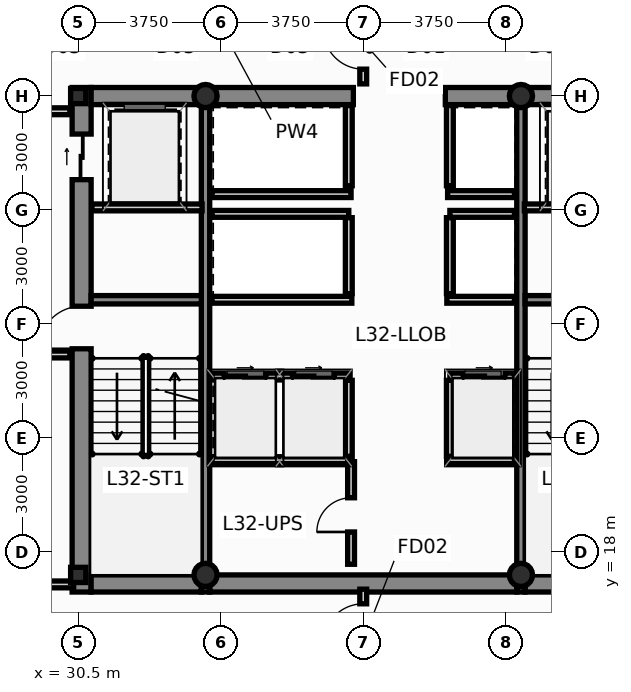
"""IFC4 building model, lengths in metres.
Left out: names, types, materials, properties, quantities, classifications, styles, units other than length and angle.
Written with IfcOpenShell. Run it as: python <this file> out.ifc"""

import sys

from ifc_helpers import new_model, si_unit, direction, frame, frame_2d, origin, origin_2d, place, context, subcontext, project, spatial, rectangle, hollow_circle, i_section, extrude, source, transform, mapped, element, fill, save


model = new_model("IFC4")
c1 = context("Model", 3, precision=1e-05, world=origin(), true_north=direction((0.0, 1.0)))
c2 = subcontext(c1, "Body", "Model", "MODEL_VIEW")
j1 = project(units=[si_unit("LENGTHUNIT", "METRE"), si_unit("PLANEANGLEUNIT", "RADIAN")], contexts=[c1])
p1 = place(None, origin())
s1 = spatial("IfcSite", under=j1, at=p1, CompositionType="ELEMENT")
p2 = place(p1, origin())
s2 = spatial("IfcBuilding", under=s1, at=p2, CompositionType="ELEMENT")
p3 = place(p2, frame((0.0, 0.0, 123.65)))
s3 = spatial("IfcBuildingStorey", under=s2, at=p3, CompositionType="ELEMENT", Elevation=123.65)
m1 = source(origin(), c2, "Body", "SweptSolid", [
    extrude(i_section(OverallWidth=0.4, OverallDepth=0.4, WebThickness=0.02, FlangeThickness=0.032, at=origin_2d()), origin(), (0.0, 0.0, 1.0), 3.65),
])
for number, where, z_axis, x_axis in (
    (1, (30.5, 17.4, 0.0), (0.0, 0.0, 1.0), (1.0, 0.0, 0.0)),
    (2, (30.5, 30.0, 0.0), (0.0, 0.0, 1.0), (1.0, 0.0, 0.0)),
):
    element("IfcColumn", number, at=place(p3, frame(where, z_axis=z_axis, x_axis=x_axis)), inside=s3, PredefinedType="COLUMN", context=c2, shape_type="MappedRepresentation", body=[
        mapped(m1, transform((0.0, 0.0, 0.0), scale=1.0)),
    ])
m2 = source(origin(), c2, "Body", "SweptSolid", [
    extrude(hollow_circle(Radius=0.305, WallThickness=0.025, at=origin_2d()), origin(), (0.0, 0.0, 1.0), 3.65),
])
for number, where, z_axis, x_axis in (
    (3, (33.85, 17.4, 0.0), (0.0, 0.0, 1.0), (1.0, 0.0, 0.0)),
    (4, (42.15, 17.4, 0.0), (0.0, 0.0, 1.0), (1.0, 0.0, 0.0)),
    (5, (33.85, 30.0, 0.0), (0.0, 0.0, 1.0), (1.0, 0.0, 0.0)),
    (6, (42.15, 30.0, 0.0), (0.0, 0.0, 1.0), (1.0, 0.0, 0.0)),
):
    element("IfcColumn", number, at=place(p3, frame(where, z_axis=z_axis, x_axis=x_axis)), inside=s3, PredefinedType="COLUMN", context=c2, shape_type="MappedRepresentation", body=[
        mapped(m2, transform((0.0, 0.0, 0.0), scale=1.0)),
    ])
p4 = place(p3, frame((30.59, 16.95, 0.0), z_axis=(0.0, 0.0, 1.0), x_axis=(0.0, 1.0, 0.0)))
e7 = element("IfcWall", 7, at=p4, inside=s3, PredefinedType="SHEAR", context=c2, shape_type="SweptSolid", body=[
    extrude(rectangle(XDim=13.275, YDim=0.5, at=frame_2d((6.638, 0.0))), origin(), (0.0, 0.0, 1.0), 3.65),
])
p5 = place(p4, frame((6.4, 0.0, 0.0)))
e8 = element("IfcOpeningElement", 8, at=p5, cuts=e7, PredefinedType="OPENING", context=c2, shape_type="SweptSolid", body=[
    extrude(rectangle(XDim=1.12, YDim=2.15, at=frame_2d((0.56, 1.075))), frame((0.0, 0.262, 0.0), z_axis=(0.0, -1.0, 0.0), x_axis=(1.0, 0.0, 0.0)), (0.0, 0.0, 1.0), 0.524),
])
p6 = place(p4, frame((10.85, 0.0, 0.0)))
e9 = element("IfcOpeningElement", 9, at=p6, cuts=e7, PredefinedType="OPENING", context=c2, shape_type="SweptSolid", body=[
    extrude(rectangle(XDim=1.2, YDim=2.2, at=frame_2d((0.6, 1.1))), frame((0.0, 0.262, 0.0), z_axis=(0.0, -1.0, 0.0), x_axis=(1.0, 0.0, 0.0)), (0.0, 0.0, 1.0), 0.524),
])
p7 = place(p3, frame((30.84, 17.175, 0.0), z_axis=(0.0, 0.0, 1.0), x_axis=(1.0, 0.0, 0.0)))
e10 = element("IfcWall", 10, at=p7, inside=s3, PredefinedType="SHEAR", context=c2, shape_type="SweptSolid", body=[
    extrude(rectangle(XDim=2.9, YDim=0.45, at=frame_2d((1.45, 0.0))), origin(), (0.0, 0.0, 1.0), 3.65),
])
p8 = place(p3, frame((33.96, 17.175, 0.0), z_axis=(0.0, 0.0, 1.0), x_axis=(1.0, 0.0, 0.0)))
e11 = element("IfcWall", 11, at=p8, inside=s3, PredefinedType="SHEAR", context=c2, shape_type="SweptSolid", body=[
    extrude(rectangle(XDim=8.08, YDim=0.45, at=frame_2d((4.04, 0.0))), origin(), (0.0, 0.0, 1.0), 3.65),
])
for number, where, z_axis, x_axis in (
    (12, (42.26, 17.175, 0.0), (0.0, 0.0, 1.0), (1.0, 0.0, 0.0)),
    (13, (30.84, 30.0, 0.0), (0.0, 0.0, 1.0), (1.0, 0.0, 0.0)),
):
    element("IfcWall", number, at=place(p3, frame(where, z_axis=z_axis, x_axis=x_axis)), inside=s3, PredefinedType="SHEAR", context=c2, shape_type="SweptSolid", body=[
        extrude(rectangle(XDim=2.9, YDim=0.45, at=frame_2d((1.45, 0.0))), origin(), (0.0, 0.0, 1.0), 3.65),
    ])
p9 = place(p3, frame((33.96, 30.0, 0.0), z_axis=(0.0, 0.0, 1.0), x_axis=(1.0, 0.0, 0.0)))
e14 = element("IfcWall", 14, at=p9, inside=s3, PredefinedType="SHEAR", context=c2, shape_type="SweptSolid", body=[
    extrude(rectangle(XDim=3.78, YDim=0.45, at=frame_2d((1.89, 0.0))), origin(), (0.0, 0.0, 1.0), 3.65),
])
p10 = place(p3, frame((40.16, 30.0, 0.0), z_axis=(0.0, 0.0, 1.0), x_axis=(1.0, 0.0, 0.0)))
e15 = element("IfcWall", 15, at=p10, inside=s3, PredefinedType="SHEAR", context=c2, shape_type="SweptSolid", body=[
    extrude(rectangle(XDim=1.88, YDim=0.45, at=frame_2d((0.94, 0.0))), origin(), (0.0, 0.0, 1.0), 3.65),
])
p11 = place(p3, frame((42.26, 30.0, 0.0), z_axis=(0.0, 0.0, 1.0), x_axis=(1.0, 0.0, 0.0)))
e16 = element("IfcWall", 16, at=p11, inside=s3, PredefinedType="SHEAR", context=c2, shape_type="SweptSolid", body=[
    extrude(rectangle(XDim=2.9, YDim=0.45, at=frame_2d((1.45, 0.0))), origin(), (0.0, 0.0, 1.0), 3.65),
])
for number, where, z_axis, x_axis in (
    (17, (33.85, 16.95, 0.0), (0.0, 0.0, 1.0), (0.0, 1.0, 0.0)),
    (18, (42.15, 16.95, 0.0), (0.0, 0.0, 1.0), (0.0, 1.0, 0.0)),
):
    element("IfcWall", number, at=place(p3, frame(where, z_axis=z_axis, x_axis=x_axis)), inside=s3, PredefinedType="SHEAR", context=c2, shape_type="SweptSolid", body=[
        extrude(rectangle(XDim=13.275, YDim=0.22, at=frame_2d((6.638, 0.0))), origin(), (0.0, 0.0, 1.0), 3.65),
    ])
for number, where, z_axis, x_axis in (
    (19, (30.84, 24.64, 0.0), (0.0, 0.0, 1.0), (1.0, 0.0, 0.0)),
    (20, (42.26, 24.64, 0.0), (0.0, 0.0, 1.0), (1.0, 0.0, 0.0)),
):
    element("IfcWall", number, at=place(p3, frame(where, z_axis=z_axis, x_axis=x_axis)), inside=s3, PredefinedType="SHEAR", context=c2, shape_type="SweptSolid", body=[
        extrude(rectangle(XDim=2.9, YDim=0.22, at=frame_2d((1.45, 0.0))), origin(), (0.0, 0.0, 1.0), 3.65),
    ])
p12 = place(p3, frame((34.02, 22.62, 0.0), z_axis=(0.0, 0.0, 1.0), x_axis=(1.0, 0.0, 0.0)))
e21 = element("IfcWall", 21, at=p12, inside=s3, PredefinedType="PARTITIONING", context=c2, shape_type="SweptSolid", body=[
    extrude(rectangle(XDim=3.6, YDim=0.18, at=frame_2d((1.8, 0.0))), origin(), (0.0, 0.0, 1.0), 3.4),
])
p13 = place(p12, frame((0.32, 0.0, 0.0)))
e22 = element("IfcOpeningElement", 22, at=p13, cuts=e21, PredefinedType="OPENING", context=c2, shape_type="SweptSolid", body=[
    extrude(rectangle(XDim=1.1, YDim=2.2, at=frame_2d((0.55, 1.1))), frame((0.0, 0.102, 0.0), z_axis=(0.0, -1.0, 0.0), x_axis=(1.0, 0.0, 0.0)), (0.0, 0.0, 1.0), 0.204),
])
p14 = place(p12, frame((2.12, 0.0, 0.0)))
e23 = element("IfcOpeningElement", 23, at=p14, cuts=e21, PredefinedType="OPENING", context=c2, shape_type="SweptSolid", body=[
    extrude(rectangle(XDim=1.1, YDim=2.2, at=frame_2d((0.55, 1.1))), frame((0.0, 0.102, 0.0), z_axis=(0.0, -1.0, 0.0), x_axis=(1.0, 0.0, 0.0)), (0.0, 0.0, 1.0), 0.204),
])
p15 = place(p3, frame((40.28, 22.62, 0.0), z_axis=(0.0, 0.0, 1.0), x_axis=(1.0, 0.0, 0.0)))
e24 = element("IfcWall", 24, at=p15, inside=s3, PredefinedType="PARTITIONING", context=c2, shape_type="SweptSolid", body=[
    extrude(rectangle(XDim=1.7, YDim=0.18, at=frame_2d((0.85, 0.0))), origin(), (0.0, 0.0, 1.0), 3.4),
])
p16 = place(p15, frame((0.35, 0.0, 0.0)))
e25 = element("IfcOpeningElement", 25, at=p16, cuts=e24, PredefinedType="OPENING", context=c2, shape_type="SweptSolid", body=[
    extrude(rectangle(XDim=1.1, YDim=2.2, at=frame_2d((0.55, 1.1))), frame((0.0, 0.102, 0.0), z_axis=(0.0, -1.0, 0.0), x_axis=(1.0, 0.0, 0.0)), (0.0, 0.0, 1.0), 0.204),
])
for number, where, z_axis, x_axis in (
    (26, (37.62, 20.52, 0.0), (0.0, 0.0, 1.0), (0.0, 1.0, 0.0)),
    (27, (40.28, 20.52, 0.0), (0.0, 0.0, 1.0), (0.0, 1.0, 0.0)),
):
    element("IfcWall", number, at=place(p3, frame(where, z_axis=z_axis, x_axis=x_axis)), inside=s3, PredefinedType="PARTITIONING", context=c2, shape_type="SweptSolid", body=[
        extrude(rectangle(XDim=2.0, YDim=0.18, at=frame_2d((1.0, 0.0))), origin(), (0.0, 0.0, 1.0), 3.4),
    ])
p17 = place(p3, frame((34.02, 26.9, 0.0), z_axis=(0.0, 0.0, 1.0), x_axis=(1.0, 0.0, 0.0)))
e28 = element("IfcWall", 28, at=p17, inside=s3, PredefinedType="PARTITIONING", context=c2, shape_type="SweptSolid", body=[
    extrude(rectangle(XDim=3.6, YDim=0.18, at=frame_2d((1.8, 0.0))), origin(), (0.0, 0.0, 1.0), 3.4),
])
p18 = place(p3, frame((40.28, 26.9, 0.0), z_axis=(0.0, 0.0, 1.0), x_axis=(1.0, 0.0, 0.0)))
e29 = element("IfcWall", 29, at=p18, inside=s3, PredefinedType="PARTITIONING", context=c2, shape_type="SweptSolid", body=[
    extrude(rectangle(XDim=1.7, YDim=0.18, at=frame_2d((0.85, 0.0))), origin(), (0.0, 0.0, 1.0), 3.4),
])
for number, where, z_axis, x_axis in (
    (30, (37.62, 24.8, 0.0), (0.0, 0.0, 1.0), (0.0, 1.0, 0.0)),
    (31, (40.28, 24.8, 0.0), (0.0, 0.0, 1.0), (0.0, 1.0, 0.0)),
):
    element("IfcWall", number, at=place(p3, frame(where, z_axis=z_axis, x_axis=x_axis)), inside=s3, PredefinedType="PARTITIONING", context=c2, shape_type="SweptSolid", body=[
        extrude(rectangle(XDim=2.0, YDim=0.18, at=frame_2d((1.0, 0.0))), origin(), (0.0, 0.0, 1.0), 3.4),
    ])
p19 = place(p3, frame((34.02, 24.64, 0.0), z_axis=(0.0, 0.0, 1.0), x_axis=(1.0, 0.0, 0.0)))
e32 = element("IfcWall", 32, at=p19, inside=s3, PredefinedType="PARTITIONING", context=c2, shape_type="SweptSolid", body=[
    extrude(rectangle(XDim=3.68, YDim=0.18, at=frame_2d((1.84, 0.0))), origin(), (0.0, 0.0, 1.0), 3.4),
])
p20 = place(p3, frame((40.2, 24.64, 0.0), z_axis=(0.0, 0.0, 1.0), x_axis=(1.0, 0.0, 0.0)))
e33 = element("IfcWall", 33, at=p20, inside=s3, PredefinedType="PARTITIONING", context=c2, shape_type="SweptSolid", body=[
    extrude(rectangle(XDim=1.78, YDim=0.18, at=frame_2d((0.89, 0.0))), origin(), (0.0, 0.0, 1.0), 3.4),
])
p21 = place(p3, frame((34.02, 27.42, 0.0), z_axis=(0.0, 0.0, 1.0), x_axis=(1.0, 0.0, 0.0)))
e34 = element("IfcWall", 34, at=p21, inside=s3, PredefinedType="PARTITIONING", context=c2, shape_type="SweptSolid", body=[
    extrude(rectangle(XDim=3.66, YDim=0.18, at=frame_2d((1.83, 0.0))), origin(), (0.0, 0.0, 1.0), 3.4),
])
p22 = place(p3, frame((40.22, 27.42, 0.0), z_axis=(0.0, 0.0, 1.0), x_axis=(1.0, 0.0, 0.0)))
e35 = element("IfcWall", 35, at=p22, inside=s3, PredefinedType="PARTITIONING", context=c2, shape_type="SweptSolid", body=[
    extrude(rectangle(XDim=1.76, YDim=0.18, at=frame_2d((0.88, 0.0))), origin(), (0.0, 0.0, 1.0), 3.4),
])
for number, where, z_axis, x_axis in (
    (36, (37.62, 27.64, 0.0), (0.0, 0.0, 1.0), (0.0, 1.0, 0.0)),
    (37, (40.28, 27.64, 0.0), (0.0, 0.0, 1.0), (0.0, 1.0, 0.0)),
):
    element("IfcWall", number, at=place(p3, frame(where, z_axis=z_axis, x_axis=x_axis)), inside=s3, PredefinedType="PARTITIONING", context=c2, shape_type="SweptSolid", body=[
        extrude(rectangle(XDim=2.11, YDim=0.18, at=frame_2d((1.055, 0.0))), origin(), (0.0, 0.0, 1.0), 3.4),
    ])
p23 = place(p3, frame((27.52, 23.2, 0.0), z_axis=(0.0, 0.0, 1.0), x_axis=(1.0, 0.0, 0.0)))
e38 = element("IfcWall", 38, at=p23, inside=s3, PredefinedType="PARTITIONING", context=c2, shape_type="SweptSolid", body=[
    extrude(rectangle(XDim=2.76, YDim=0.18, at=frame_2d((1.38, 0.0))), origin(), (0.0, 0.0, 1.0), 3.4),
])
p24 = place(p3, frame((27.52, 29.6, 0.0), z_axis=(0.0, 0.0, 1.0), x_axis=(1.0, 0.0, 0.0)))
e39 = element("IfcWall", 39, at=p24, inside=s3, PredefinedType="PARTITIONING", context=c2, shape_type="SweptSolid", body=[
    extrude(rectangle(XDim=2.76, YDim=0.18, at=frame_2d((1.38, 0.0))), origin(), (0.0, 0.0, 1.0), 2.783),
])
for number, where, z_axis, x_axis in (
    (40, (30.86, 27.07, 0.0), (0.0, 0.0, 1.0), (1.0, 0.0, 0.0)),
    (41, (42.24, 27.07, 0.0), (0.0, 0.0, 1.0), (1.0, 0.0, 0.0)),
):
    element("IfcWall", number, at=place(p3, frame(where, z_axis=z_axis, x_axis=x_axis)), inside=s3, PredefinedType="PARTITIONING", context=c2, shape_type="SweptSolid", body=[
        extrude(rectangle(XDim=2.9, YDim=0.18, at=frame_2d((1.45, 0.0))), origin(), (0.0, 0.0, 1.0), 3.4),
    ])
p25 = place(p3, frame((34.02, 20.42, 0.0), z_axis=(0.0, 0.0, 1.0), x_axis=(1.0, 0.0, 0.0)))
e42 = element("IfcWall", 42, at=p25, inside=s3, PredefinedType="PARTITIONING", context=c2, shape_type="SweptSolid", body=[
    extrude(rectangle(XDim=3.64, YDim=0.18, at=frame_2d((1.82, 0.0))), origin(), (0.0, 0.0, 1.0), 3.4),
])
p26 = place(p3, frame((40.22, 20.42, 0.0), z_axis=(0.0, 0.0, 1.0), x_axis=(1.0, 0.0, 0.0)))
e43 = element("IfcWall", 43, at=p26, inside=s3, PredefinedType="PARTITIONING", context=c2, shape_type="SweptSolid", body=[
    extrude(rectangle(XDim=1.76, YDim=0.18, at=frame_2d((0.88, 0.0))), origin(), (0.0, 0.0, 1.0), 3.4),
])
p27 = place(p3, frame((37.68, 17.68, 0.0), z_axis=(0.0, 0.0, 1.0), x_axis=(0.0, 1.0, 0.0)))
e44 = element("IfcWall", 44, at=p27, inside=s3, PredefinedType="PARTITIONING", context=c2, shape_type="SweptSolid", body=[
    extrude(rectangle(XDim=2.7, YDim=0.18, at=frame_2d((1.35, 0.0))), origin(), (0.0, 0.0, 1.0), 3.4),
])
p28 = place(p27, frame((0.85, 0.0, 0.0)))
e45 = element("IfcOpeningElement", 45, at=p28, cuts=e44, PredefinedType="OPENING", context=c2, shape_type="SweptSolid", body=[
    extrude(rectangle(XDim=0.9, YDim=2.1, at=frame_2d((0.45, 1.05))), frame((0.0, 0.102, 0.0), z_axis=(0.0, -1.0, 0.0), x_axis=(1.0, 0.0, 0.0)), (0.0, 0.0, 1.0), 0.204),
])
p29 = place(p3, frame((27.48, 17.15, 0.0), z_axis=(0.0, 0.0, 1.0), x_axis=(1.0, 0.0, 0.0)))
e46 = element("IfcWall", 46, at=p29, inside=s3, PredefinedType="PARTITIONING", context=c2, shape_type="SweptSolid", body=[
    extrude(rectangle(XDim=2.9, YDim=0.18, at=frame_2d((1.45, 0.0))), origin(), (0.0, 0.0, 1.0), 2.783),
])
p30 = place(p3, frame((38.0, 15.205, 0.0), z_axis=(0.0, 0.0, 1.0), x_axis=(0.0, 1.0, 0.0)))
e47 = element("IfcWall", 47, at=p30, inside=s3, PredefinedType="PARTITIONING", context=c2, shape_type="SweptSolid", body=[
    extrude(rectangle(XDim=1.82, YDim=0.18, at=frame_2d((0.91, 0.0))), origin(), (0.0, 0.0, 1.0), 3.4),
])
p31 = place(p30, frame((0.385, 0.0, 0.0)))
e48 = element("IfcOpeningElement", 48, at=p31, cuts=e47, PredefinedType="OPENING", context=c2, shape_type="SweptSolid", body=[
    extrude(rectangle(XDim=1.05, YDim=2.15, at=frame_2d((0.525, 1.075))), frame((0.0, 0.102, 0.0), z_axis=(0.0, -1.0, 0.0), x_axis=(1.0, 0.0, 0.0)), (0.0, 0.0, 1.0), 0.204),
])
p32 = place(p3, frame((38.0, 30.32, 0.0), z_axis=(0.0, 0.0, 1.0), x_axis=(0.0, 1.0, 0.0)))
e49 = element("IfcWall", 49, at=p32, inside=s3, PredefinedType="PARTITIONING", context=c2, shape_type="SweptSolid", body=[
    extrude(rectangle(XDim=1.825, YDim=0.18, at=frame_2d((0.913, 0.0))), origin(), (0.0, 0.0, 1.0), 3.4),
])
p33 = place(p32, frame((0.388, 0.0, 0.0)))
e50 = element("IfcOpeningElement", 50, at=p33, cuts=e49, PredefinedType="OPENING", context=c2, shape_type="SweptSolid", body=[
    extrude(rectangle(XDim=1.05, YDim=2.15, at=frame_2d((0.525, 1.075))), frame((0.0, 0.102, 0.0), z_axis=(0.0, -1.0, 0.0), x_axis=(1.0, 0.0, 0.0)), (0.0, 0.0, 1.0), 0.204),
])
p34 = place(p5, origin())
e51 = element("IfcDoor", 51, at=p34, inside=s3, OperationType="SINGLE_SWING_LEFT", PredefinedType="DOOR", context=c2, shape_type="SweptSolid", body=[
    extrude(rectangle(XDim=1.12, YDim=2.15, at=frame_2d((0.56, 1.075))), frame((0.0, 0.025, 0.0), z_axis=(0.0, -1.0, 0.0), x_axis=(1.0, 0.0, 0.0)), (0.0, 0.0, 1.0), 0.05),
])
fill(e8, e51)
p35 = place(p6, origin())
e52 = element("IfcDoor", 52, at=p35, inside=s3, OperationType="SLIDING_TO_LEFT", PredefinedType="DOOR", context=c2, shape_type="SweptSolid", body=[
    extrude(rectangle(XDim=1.2, YDim=2.2, at=frame_2d((0.6, 1.1))), frame((0.0, 0.025, 0.0), z_axis=(0.0, -1.0, 0.0), x_axis=(1.0, 0.0, 0.0)), (0.0, 0.0, 1.0), 0.05),
])
fill(e9, e52)
p36 = place(p13, origin())
e53 = element("IfcDoor", 53, at=p36, inside=s3, OperationType="SLIDING_TO_LEFT", PredefinedType="DOOR", context=c2, shape_type="SweptSolid", body=[
    extrude(rectangle(XDim=1.1, YDim=2.2, at=frame_2d((0.55, 1.1))), frame((0.0, 0.025, 0.0), z_axis=(0.0, -1.0, 0.0), x_axis=(1.0, 0.0, 0.0)), (0.0, 0.0, 1.0), 0.05),
])
fill(e22, e53)
p37 = place(p14, origin())
e54 = element("IfcDoor", 54, at=p37, inside=s3, OperationType="SLIDING_TO_RIGHT", PredefinedType="DOOR", context=c2, shape_type="SweptSolid", body=[
    extrude(rectangle(XDim=1.1, YDim=2.2, at=frame_2d((0.55, 1.1))), frame((0.0, 0.025, 0.0), z_axis=(0.0, -1.0, 0.0), x_axis=(1.0, 0.0, 0.0)), (0.0, 0.0, 1.0), 0.05),
])
fill(e23, e54)
p38 = place(p16, origin())
e55 = element("IfcDoor", 55, at=p38, inside=s3, OperationType="SLIDING_TO_LEFT", PredefinedType="DOOR", context=c2, shape_type="SweptSolid", body=[
    extrude(rectangle(XDim=1.1, YDim=2.2, at=frame_2d((0.55, 1.1))), frame((0.0, 0.025, 0.0), z_axis=(0.0, -1.0, 0.0), x_axis=(1.0, 0.0, 0.0)), (0.0, 0.0, 1.0), 0.05),
])
fill(e25, e55)
p39 = place(p28, origin())
e56 = element("IfcDoor", 56, at=p39, inside=s3, OperationType="SINGLE_SWING_LEFT", PredefinedType="DOOR", context=c2, shape_type="SweptSolid", body=[
    extrude(rectangle(XDim=0.9, YDim=2.1, at=frame_2d((0.45, 1.05))), frame((0.0, 0.025, 0.0), z_axis=(0.0, -1.0, 0.0), x_axis=(1.0, 0.0, 0.0)), (0.0, 0.0, 1.0), 0.05),
])
fill(e45, e56)
p40 = place(p31, origin())
e57 = element("IfcDoor", 57, at=p40, inside=s3, OperationType="SINGLE_SWING_LEFT", PredefinedType="DOOR", context=c2, shape_type="SweptSolid", body=[
    extrude(rectangle(XDim=1.05, YDim=2.15, at=frame_2d((0.525, 1.075))), frame((0.0, 0.025, 0.0), z_axis=(0.0, -1.0, 0.0), x_axis=(1.0, 0.0, 0.0)), (0.0, 0.0, 1.0), 0.05),
])
fill(e48, e57)
p41 = place(p33, origin())
e58 = element("IfcDoor", 58, at=p41, inside=s3, OperationType="SINGLE_SWING_RIGHT", PredefinedType="DOOR", context=c2, shape_type="SweptSolid", body=[
    extrude(rectangle(XDim=1.05, YDim=2.15, at=frame_2d((0.525, 1.075))), frame((0.0, 0.025, 0.0), z_axis=(0.0, -1.0, 0.0), x_axis=(1.0, 0.0, 0.0)), (0.0, 0.0, 1.0), 0.05),
])
fill(e50, e58)
save(model, sys.argv[1])
